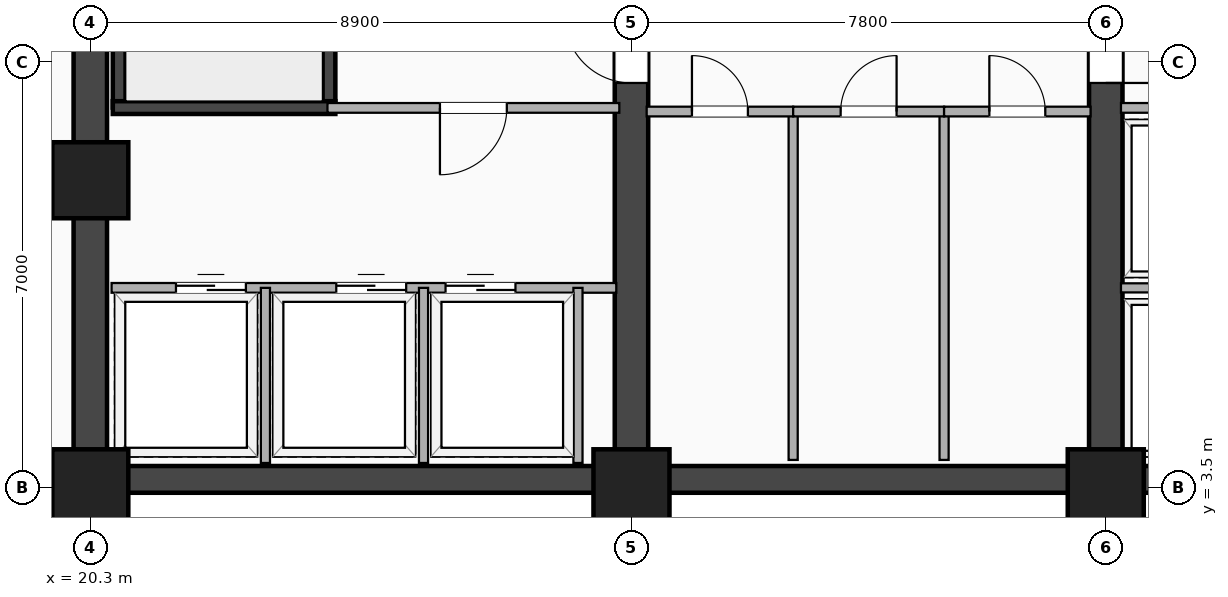
"""IFC4 building model, lengths in metres.
Left out: names, types, materials, properties, quantities, classifications, styles, units other than length and angle.
Written with IfcOpenShell. Run it as: python <this file> out.ifc"""

import sys

from ifc_helpers import new_model, si_unit, direction, frame, frame_2d, origin, origin_2d, place, context, subcontext, project, spatial, rectangle, extrude, element, fill, save


model = new_model("IFC4")
c1 = context("Model", 3, precision=1e-05, world=origin(), true_north=direction((0.0, 1.0)))
c2 = subcontext(c1, "Body", "Model", "MODEL_VIEW")
j1 = project(units=[si_unit("LENGTHUNIT", "METRE"), si_unit("PLANEANGLEUNIT", "RADIAN")], contexts=[c1])
p1 = place(None, origin())
s1 = spatial("IfcSite", under=j1, at=p1, CompositionType="ELEMENT")
p2 = place(p1, origin())
s2 = spatial("IfcBuilding", under=s1, at=p2, CompositionType="ELEMENT")
p3 = place(p2, frame((0.0, 0.0, 95.2)))
s3 = spatial("IfcBuildingStorey", under=s2, at=p3, CompositionType="ELEMENT", Elevation=95.2)
p4 = place(p3, frame((20.3, 3.63, 0.0), z_axis=(0.0, 0.0, 1.0), x_axis=(1.0, 0.0, 0.0)))
e1 = element("IfcWall", 1, at=p4, inside=s3, PredefinedType="SHEAR", context=c2, shape_type="SweptSolid", body=[
    extrude(rectangle(XDim=24.5, YDim=0.44, at=frame_2d((12.25, 0.0))), origin(), (0.0, 0.0, 1.0), 3.24),
])
p5 = place(p3, frame((20.3, 3.5, 0.0), z_axis=(0.0, 0.0, 1.0), x_axis=(0.0, 1.0, 0.0)))
e2 = element("IfcWall", 2, at=p5, inside=s3, PredefinedType="SHEAR", context=c2, shape_type="SweptSolid", body=[
    extrude(rectangle(XDim=16.9, YDim=0.55, at=frame_2d((8.45, 0.0))), origin(), (0.0, 0.0, 1.0), 3.24),
])
p6 = place(p3, frame((29.2, 3.5, 0.0), z_axis=(0.0, 0.0, 1.0), x_axis=(0.0, 1.0, 0.0)))
e3 = element("IfcWall", 3, at=p6, inside=s3, PredefinedType="SHEAR", context=c2, shape_type="SweptSolid", body=[
    extrude(rectangle(XDim=16.9, YDim=0.55, at=frame_2d((8.45, 0.0))), origin(), (0.0, 0.0, 1.0), 3.24),
])
p7 = place(p6, frame((7.75, 0.0, 0.0), z_axis=(0.0, 0.0, 1.0), x_axis=(-1.0, 0.0, 0.0)))
e4 = element("IfcOpeningElement", 4, at=p7, cuts=e3, PredefinedType="OPENING", context=c2, shape_type="SweptSolid", body=[
    extrude(rectangle(XDim=1.1, YDim=2.15, at=frame_2d((0.55, 1.075))), frame((0.0, 0.285, 0.0), z_axis=(0.0, -1.0, 0.0), x_axis=(1.0, 0.0, 0.0)), (0.0, 0.0, 1.0), 0.57),
])
p8 = place(p3, frame((37.0, 3.5, 0.0), z_axis=(0.0, 0.0, 1.0), x_axis=(0.0, 1.0, 0.0)))
e5 = element("IfcWall", 5, at=p8, inside=s3, PredefinedType="SHEAR", context=c2, shape_type="SweptSolid", body=[
    extrude(rectangle(XDim=16.9, YDim=0.55, at=frame_2d((8.45, 0.0))), origin(), (0.0, 0.0, 1.0), 3.24),
])
p9 = place(p8, frame((6.65, 0.0, 0.0)))
e6 = element("IfcOpeningElement", 6, at=p9, cuts=e5, PredefinedType="OPENING", context=c2, shape_type="SweptSolid", body=[
    extrude(rectangle(XDim=1.1, YDim=2.15, at=frame_2d((0.55, 1.075))), frame((0.0, 0.285, 0.0), z_axis=(0.0, -1.0, 0.0), x_axis=(1.0, 0.0, 0.0)), (0.0, 0.0, 1.0), 0.57),
])
for number, where, z_axis, x_axis in (
    (7, (20.775, 9.745, 0.0), (0.0, 0.0, 1.0), (0.0, 1.0, 0.0)),
    (8, (24.225, 9.745, 0.0), (0.0, 0.0, 1.0), (0.0, 1.0, 0.0)),
):
    element("IfcWall", number, at=place(p3, frame(where, z_axis=z_axis, x_axis=x_axis)), inside=s3, PredefinedType="SHEAR", context=c2, shape_type="SweptSolid", body=[
        extrude(rectangle(XDim=8.01, YDim=0.21, at=frame_2d((4.005, 0.0))), origin(), (0.0, 0.0, 1.0), 3.24),
    ])
p10 = place(p3, frame((20.67, 9.745, 0.0), z_axis=(0.0, 0.0, 1.0), x_axis=(1.0, 0.0, 0.0)))
e9 = element("IfcWall", 9, at=p10, inside=s3, PredefinedType="SHEAR", context=c2, shape_type="SweptSolid", body=[
    extrude(rectangle(XDim=3.66, YDim=0.21, at=frame_2d((1.83, 0.0))), origin(), (0.0, 0.0, 1.0), 3.24),
])
for number, where, z_axis, x_axis in (
    (10, (20.3, 3.5, -0.26), (0.0, 0.0, 1.0), (1.0, 0.0, 0.0)),
    (11, (29.2, 3.5, -0.26), (0.0, 0.0, 1.0), (1.0, 0.0, 0.0)),
    (12, (37.0, 3.5, -0.26), (0.0, 0.0, 1.0), (1.0, 0.0, 0.0)),
    (13, (20.3, 8.55, -0.26), (0.0, 0.0, 1.0), (1.0, 0.0, 0.0)),
):
    element("IfcColumn", number, at=place(p3, frame(where, z_axis=z_axis, x_axis=x_axis)), inside=s3, PredefinedType="COLUMN", context=c2, shape_type="SweptSolid", body=[
        extrude(rectangle(XDim=1.25, YDim=1.25, at=origin_2d()), origin(), (0.0, 0.0, 1.0), 3.5),
    ])
p11 = place(p3, frame((20.65, 6.78, 0.0), z_axis=(0.0, 0.0, 1.0), x_axis=(1.0, 0.0, 0.0)))
e14 = element("IfcWall", 14, at=p11, inside=s3, PredefinedType="PARTITIONING", context=c2, shape_type="SweptSolid", body=[
    extrude(rectangle(XDim=8.3, YDim=0.16, at=frame_2d((4.15, 0.0))), origin(), (0.0, 0.0, 1.0), 2.313),
])
p12 = place(p11, frame((3.695, 0.0, 0.0)))
e15 = element("IfcOpeningElement", 15, at=p12, cuts=e14, PredefinedType="OPENING", context=c2, shape_type="SweptSolid", body=[
    extrude(rectangle(XDim=1.15, YDim=2.2, at=frame_2d((0.575, 1.1))), frame((0.0, 0.09, 0.0), z_axis=(0.0, -1.0, 0.0), x_axis=(1.0, 0.0, 0.0)), (0.0, 0.0, 1.0), 0.18),
])
p13 = place(p11, frame((5.492, 0.0, 0.0)))
e16 = element("IfcOpeningElement", 16, at=p13, cuts=e14, PredefinedType="OPENING", context=c2, shape_type="SweptSolid", body=[
    extrude(rectangle(XDim=1.15, YDim=2.2, at=frame_2d((0.575, 1.1))), frame((0.0, 0.09, 0.0), z_axis=(0.0, -1.0, 0.0), x_axis=(1.0, 0.0, 0.0)), (0.0, 0.0, 1.0), 0.18),
])
p14 = place(p11, frame((1.059, 0.0, 0.0)))
e17 = element("IfcOpeningElement", 17, at=p14, cuts=e14, PredefinedType="OPENING", context=c2, shape_type="SweptSolid", body=[
    extrude(rectangle(XDim=1.15, YDim=2.2, at=frame_2d((0.575, 1.1))), frame((0.0, 0.09, 0.0), z_axis=(0.0, -1.0, 0.0), x_axis=(1.0, 0.0, 0.0)), (0.0, 0.0, 1.0), 0.18),
])
for number, where, z_axis, x_axis in (
    (18, (23.18, 3.9, 0.0), (0.0, 0.0, 1.0), (0.0, 1.0, 0.0)),
    (19, (25.78, 3.9, 0.0), (0.0, 0.0, 1.0), (0.0, 1.0, 0.0)),
    (20, (28.32, 3.9, 0.0), (0.0, 0.0, 1.0), (0.0, 1.0, 0.0)),
):
    element("IfcWall", number, at=place(p3, frame(where, z_axis=z_axis, x_axis=x_axis)), inside=s3, PredefinedType="PARTITIONING", context=c2, shape_type="SweptSolid", body=[
        extrude(rectangle(XDim=2.88, YDim=0.15, at=frame_2d((1.44, 0.0))), origin(), (0.0, 0.0, 1.0), 3.24),
    ])
p15 = place(p3, frame((24.2, 9.74, 0.0), z_axis=(0.0, 0.0, 1.0), x_axis=(1.0, 0.0, 0.0)))
e21 = element("IfcWall", 21, at=p15, inside=s3, PredefinedType="PARTITIONING", context=c2, shape_type="SweptSolid", body=[
    extrude(rectangle(XDim=4.8, YDim=0.16, at=frame_2d((2.4, 0.0))), origin(), (0.0, 0.0, 1.0), 3.24),
])
p16 = place(p15, frame((1.85, 0.0, 0.0)))
e22 = element("IfcOpeningElement", 22, at=p16, cuts=e21, PredefinedType="OPENING", context=c2, shape_type="SweptSolid", body=[
    extrude(rectangle(XDim=1.1, YDim=2.15, at=frame_2d((0.55, 1.075))), frame((0.0, 0.09, 0.0), z_axis=(0.0, -1.0, 0.0), x_axis=(1.0, 0.0, 0.0)), (0.0, 0.0, 1.0), 0.18),
])
p17 = place(p3, frame((37.25, 6.78, 0.0), z_axis=(0.0, 0.0, 1.0), x_axis=(1.0, 0.0, 0.0)))
e23 = element("IfcWall", 23, at=p17, inside=s3, PredefinedType="PARTITIONING", context=c2, shape_type="SweptSolid", body=[
    extrude(rectangle(XDim=2.17, YDim=0.15, at=frame_2d((1.085, 0.0))), origin(), (0.0, 0.0, 1.0), 3.24),
])
p18 = place(p3, frame((37.25, 9.74, 0.0), z_axis=(0.0, 0.0, 1.0), x_axis=(1.0, 0.0, 0.0)))
e24 = element("IfcWall", 24, at=p18, inside=s3, PredefinedType="PARTITIONING", context=c2, shape_type="SweptSolid", body=[
    extrude(rectangle(XDim=2.17, YDim=0.16, at=frame_2d((1.085, 0.0))), origin(), (0.0, 0.0, 1.0), 3.24),
])
p19 = place(p3, frame((31.859, 3.95, 0.0), z_axis=(0.0, 0.0, 1.0), x_axis=(0.0, 1.0, 0.0)))
e25 = element("IfcWall", 25, at=p19, inside=s3, PredefinedType="PARTITIONING", context=c2, shape_type="SweptSolid", body=[
    extrude(rectangle(XDim=5.73, YDim=0.15, at=frame_2d((2.865, 0.0))), origin(), (0.0, 0.0, 1.0), 3.24),
])
p20 = place(p3, frame((29.45, 9.68, 0.0), z_axis=(0.0, 0.0, 1.0), x_axis=(1.0, 0.0, 0.0)))
e26 = element("IfcWall", 26, at=p20, inside=s3, PredefinedType="PARTITIONING", context=c2, shape_type="SweptSolid", body=[
    extrude(rectangle(XDim=2.409, YDim=0.16, at=frame_2d((1.205, 0.0))), origin(), (0.0, 0.0, 1.0), 3.24),
])
p21 = place(p20, frame((1.664, 0.0, 0.0), z_axis=(0.0, 0.0, 1.0), x_axis=(-1.0, 0.0, 0.0)))
e27 = element("IfcOpeningElement", 27, at=p21, cuts=e26, PredefinedType="OPENING", context=c2, shape_type="SweptSolid", body=[
    extrude(rectangle(XDim=0.92, YDim=2.08, at=frame_2d((0.46, 1.04))), frame((0.0, 0.09, 0.0), z_axis=(0.0, -1.0, 0.0), x_axis=(1.0, 0.0, 0.0)), (0.0, 0.0, 1.0), 0.18),
])
p22 = place(p3, frame((34.341, 3.95, 0.0), z_axis=(0.0, 0.0, 1.0), x_axis=(0.0, 1.0, 0.0)))
e28 = element("IfcWall", 28, at=p22, inside=s3, PredefinedType="PARTITIONING", context=c2, shape_type="SweptSolid", body=[
    extrude(rectangle(XDim=5.73, YDim=0.15, at=frame_2d((2.865, 0.0))), origin(), (0.0, 0.0, 1.0), 3.24),
])
p23 = place(p3, frame((31.859, 9.68, 0.0), z_axis=(0.0, 0.0, 1.0), x_axis=(1.0, 0.0, 0.0)))
e29 = element("IfcWall", 29, at=p23, inside=s3, PredefinedType="PARTITIONING", context=c2, shape_type="SweptSolid", body=[
    extrude(rectangle(XDim=2.482, YDim=0.16, at=frame_2d((1.241, 0.0))), origin(), (0.0, 0.0, 1.0), 3.24),
])
p24 = place(p23, frame((1.701, 0.0, 0.0), z_axis=(0.0, 0.0, 1.0), x_axis=(-1.0, 0.0, 0.0)))
e30 = element("IfcOpeningElement", 30, at=p24, cuts=e29, PredefinedType="OPENING", context=c2, shape_type="SweptSolid", body=[
    extrude(rectangle(XDim=0.92, YDim=2.08, at=frame_2d((0.46, 1.04))), frame((0.0, 0.09, 0.0), z_axis=(0.0, -1.0, 0.0), x_axis=(1.0, 0.0, 0.0)), (0.0, 0.0, 1.0), 0.18),
])
p25 = place(p3, frame((34.341, 9.68, 0.0), z_axis=(0.0, 0.0, 1.0), x_axis=(1.0, 0.0, 0.0)))
e31 = element("IfcWall", 31, at=p25, inside=s3, PredefinedType="PARTITIONING", context=c2, shape_type="SweptSolid", body=[
    extrude(rectangle(XDim=2.409, YDim=0.16, at=frame_2d((1.205, 0.0))), origin(), (0.0, 0.0, 1.0), 3.24),
])
p26 = place(p25, frame((1.664, 0.0, 0.0), z_axis=(0.0, 0.0, 1.0), x_axis=(-1.0, 0.0, 0.0)))
e32 = element("IfcOpeningElement", 32, at=p26, cuts=e31, PredefinedType="OPENING", context=c2, shape_type="SweptSolid", body=[
    extrude(rectangle(XDim=0.92, YDim=2.08, at=frame_2d((0.46, 1.04))), frame((0.0, 0.09, 0.0), z_axis=(0.0, -1.0, 0.0), x_axis=(1.0, 0.0, 0.0)), (0.0, 0.0, 1.0), 0.18),
])
p27 = place(p7, origin())
e33 = element("IfcDoor", 33, at=p27, inside=s3, OperationType="SINGLE_SWING_RIGHT", PredefinedType="DOOR", context=c2, shape_type="SweptSolid", body=[
    extrude(rectangle(XDim=1.1, YDim=2.15, at=frame_2d((0.55, 1.075))), frame((0.0, 0.025, 0.0), z_axis=(0.0, -1.0, 0.0), x_axis=(1.0, 0.0, 0.0)), (0.0, 0.0, 1.0), 0.05),
])
fill(e4, e33)
p28 = place(p9, origin())
e34 = element("IfcDoor", 34, at=p28, inside=s3, OperationType="SINGLE_SWING_LEFT", PredefinedType="DOOR", context=c2, shape_type="SweptSolid", body=[
    extrude(rectangle(XDim=1.1, YDim=2.15, at=frame_2d((0.55, 1.075))), frame((0.0, 0.025, 0.0), z_axis=(0.0, -1.0, 0.0), x_axis=(1.0, 0.0, 0.0)), (0.0, 0.0, 1.0), 0.05),
])
fill(e6, e34)
p29 = place(p12, origin())
e35 = element("IfcDoor", 35, at=p29, inside=s3, OperationType="DOUBLE_DOOR_SLIDING", PredefinedType="DOOR", context=c2, shape_type="SweptSolid", body=[
    extrude(rectangle(XDim=1.15, YDim=2.2, at=frame_2d((0.575, 1.1))), frame((0.0, 0.025, 0.0), z_axis=(0.0, -1.0, 0.0), x_axis=(1.0, 0.0, 0.0)), (0.0, 0.0, 1.0), 0.05),
])
fill(e15, e35)
p30 = place(p13, origin())
e36 = element("IfcDoor", 36, at=p30, inside=s3, OperationType="DOUBLE_DOOR_SLIDING", PredefinedType="DOOR", context=c2, shape_type="SweptSolid", body=[
    extrude(rectangle(XDim=1.15, YDim=2.2, at=frame_2d((0.575, 1.1))), frame((0.0, 0.025, 0.0), z_axis=(0.0, -1.0, 0.0), x_axis=(1.0, 0.0, 0.0)), (0.0, 0.0, 1.0), 0.05),
])
fill(e16, e36)
p31 = place(p14, origin())
e37 = element("IfcDoor", 37, at=p31, inside=s3, OperationType="DOUBLE_DOOR_SLIDING", PredefinedType="DOOR", context=c2, shape_type="SweptSolid", body=[
    extrude(rectangle(XDim=1.15, YDim=2.2, at=frame_2d((0.575, 1.1))), frame((0.0, 0.025, 0.0), z_axis=(0.0, -1.0, 0.0), x_axis=(1.0, 0.0, 0.0)), (0.0, 0.0, 1.0), 0.05),
])
fill(e17, e37)
p32 = place(p16, origin())
e38 = element("IfcDoor", 38, at=p32, inside=s3, OperationType="SINGLE_SWING_LEFT", PredefinedType="DOOR", context=c2, shape_type="SweptSolid", body=[
    extrude(rectangle(XDim=1.1, YDim=2.15, at=frame_2d((0.55, 1.075))), frame((0.0, 0.025, 0.0), z_axis=(0.0, -1.0, 0.0), x_axis=(1.0, 0.0, 0.0)), (0.0, 0.0, 1.0), 0.05),
])
fill(e22, e38)
p33 = place(p21, origin())
e39 = element("IfcDoor", 39, at=p33, inside=s3, OperationType="SINGLE_SWING_LEFT", PredefinedType="DOOR", context=c2, shape_type="SweptSolid", body=[
    extrude(rectangle(XDim=0.92, YDim=2.08, at=frame_2d((0.46, 1.04))), frame((0.0, 0.025, 0.0), z_axis=(0.0, -1.0, 0.0), x_axis=(1.0, 0.0, 0.0)), (0.0, 0.0, 1.0), 0.05),
])
fill(e27, e39)
p34 = place(p24, origin())
e40 = element("IfcDoor", 40, at=p34, inside=s3, OperationType="SINGLE_SWING_RIGHT", PredefinedType="DOOR", context=c2, shape_type="SweptSolid", body=[
    extrude(rectangle(XDim=0.92, YDim=2.08, at=frame_2d((0.46, 1.04))), frame((0.0, 0.025, 0.0), z_axis=(0.0, -1.0, 0.0), x_axis=(1.0, 0.0, 0.0)), (0.0, 0.0, 1.0), 0.05),
])
fill(e30, e40)
p35 = place(p26, origin())
e41 = element("IfcDoor", 41, at=p35, inside=s3, OperationType="SINGLE_SWING_LEFT", PredefinedType="DOOR", context=c2, shape_type="SweptSolid", body=[
    extrude(rectangle(XDim=0.92, YDim=2.08, at=frame_2d((0.46, 1.04))), frame((0.0, 0.025, 0.0), z_axis=(0.0, -1.0, 0.0), x_axis=(1.0, 0.0, 0.0)), (0.0, 0.0, 1.0), 0.05),
])
fill(e32, e41)
save(model, sys.argv[1])
